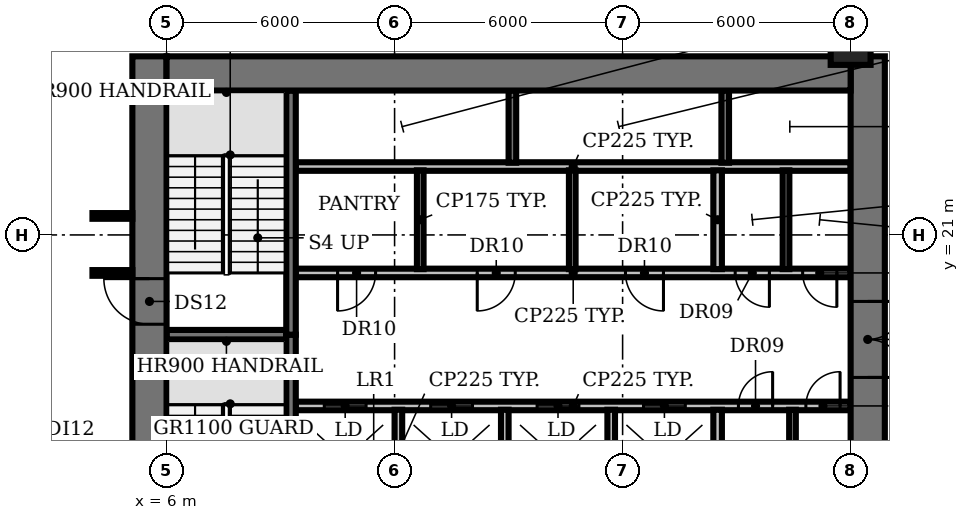
"""IFC4 building model, lengths in metres.
Left out: names, types, materials, properties, quantities, classifications, styles, units other than length and angle.
Written with IfcOpenShell. Run it as: python <this file> out.ifc"""

import sys

from ifc_helpers import new_model, si_unit, direction, frame, frame_2d, origin, origin_2d, place, context, subcontext, project, spatial, rectangle, circle, extrude, element, fill, save


model = new_model("IFC4")
c1 = context("Model", 3, precision=1e-05, world=origin(), true_north=direction((0.0, 1.0)))
c2 = subcontext(c1, "Body", "Model", "MODEL_VIEW")
j1 = project(units=[si_unit("LENGTHUNIT", "METRE"), si_unit("PLANEANGLEUNIT", "RADIAN")], contexts=[c1])
p1 = place(None, origin())
s1 = spatial("IfcSite", under=j1, at=p1, CompositionType="ELEMENT")
p2 = place(p1, origin())
s2 = spatial("IfcBuilding", under=s1, at=p2, CompositionType="ELEMENT")
p3 = place(p2, frame((0.0, 0.0, 58.4)))
s3 = spatial("IfcBuildingStorey", under=s2, at=p3, CompositionType="ELEMENT", Elevation=58.4)
p4 = place(p3, frame((24.0, 26.0, 0.0), z_axis=(0.0, 0.0, 1.0), x_axis=(1.0, 0.0, 0.0)))
e1 = element("IfcColumn", 1, at=p4, inside=s3, PredefinedType="COLUMN", context=c2, shape_type="SweptSolid", body=[
    extrude(circle(Radius=0.525, at=origin_2d()), origin(), (0.0, 0.0, 1.0), 3.85),
])
p5 = place(p3, frame((9.4, 16.5, 0.0), z_axis=(0.0, 0.0, 1.0), x_axis=(1.0, 0.0, 0.0)))
e2 = element("IfcWall", 2, at=p5, inside=s3, PredefinedType="PARTITIONING", context=c2, shape_type="SweptSolid", body=[
    extrude(rectangle(XDim=14.6, YDim=0.225, at=frame_2d((7.3, 0.0))), origin(), (0.0, 0.0, 1.0), 3.85),
])
p6 = place(p5, frame((0.75, 0.0, 0.0)))
e3 = element("IfcOpeningElement", 3, at=p6, cuts=e2, PredefinedType="OPENING", context=c2, shape_type="SweptSolid", body=[
    extrude(rectangle(XDim=1.1, YDim=2.1, at=frame_2d((0.55, 1.05))), frame((0.0, 0.123, 0.0), z_axis=(0.0, -1.0, 0.0), x_axis=(1.0, 0.0, 0.0)), (0.0, 0.0, 1.0), 0.245),
])
p7 = place(p5, frame((3.55, 0.0, 0.0)))
e4 = element("IfcOpeningElement", 4, at=p7, cuts=e2, PredefinedType="OPENING", context=c2, shape_type="SweptSolid", body=[
    extrude(rectangle(XDim=1.1, YDim=2.1, at=frame_2d((0.55, 1.05))), frame((0.0, 0.123, 0.0), z_axis=(0.0, -1.0, 0.0), x_axis=(1.0, 0.0, 0.0)), (0.0, 0.0, 1.0), 0.245),
])
p8 = place(p5, frame((6.35, 0.0, 0.0)))
e5 = element("IfcOpeningElement", 5, at=p8, cuts=e2, PredefinedType="OPENING", context=c2, shape_type="SweptSolid", body=[
    extrude(rectangle(XDim=1.1, YDim=2.1, at=frame_2d((0.55, 1.05))), frame((0.0, 0.123, 0.0), z_axis=(0.0, -1.0, 0.0), x_axis=(1.0, 0.0, 0.0)), (0.0, 0.0, 1.0), 0.245),
])
p9 = place(p5, frame((9.15, 0.0, 0.0)))
e6 = element("IfcOpeningElement", 6, at=p9, cuts=e2, PredefinedType="OPENING", context=c2, shape_type="SweptSolid", body=[
    extrude(rectangle(XDim=1.1, YDim=2.1, at=frame_2d((0.55, 1.05))), frame((0.0, 0.123, 0.0), z_axis=(0.0, -1.0, 0.0), x_axis=(1.0, 0.0, 0.0)), (0.0, 0.0, 1.0), 0.245),
])
p10 = place(p5, frame((11.647, 0.0, 0.0)))
e7 = element("IfcOpeningElement", 7, at=p10, cuts=e2, PredefinedType="OPENING", context=c2, shape_type="SweptSolid", body=[
    extrude(rectangle(XDim=0.9, YDim=2.1, at=frame_2d((0.45, 1.05))), frame((0.0, 0.123, 0.0), z_axis=(0.0, -1.0, 0.0), x_axis=(1.0, 0.0, 0.0)), (0.0, 0.0, 1.0), 0.245),
])
p11 = place(p5, frame((13.423, 0.0, 0.0)))
e8 = element("IfcOpeningElement", 8, at=p11, cuts=e2, PredefinedType="OPENING", context=c2, shape_type="SweptSolid", body=[
    extrude(rectangle(XDim=0.9, YDim=2.1, at=frame_2d((0.45, 1.05))), frame((0.0, 0.123, 0.0), z_axis=(0.0, -1.0, 0.0), x_axis=(1.0, 0.0, 0.0)), (0.0, 0.0, 1.0), 0.245),
])
p12 = place(p3, frame((6.0, 18.375, 0.0), z_axis=(0.0, 0.0, 1.0), x_axis=(1.0, 0.0, 0.0)))
e9 = element("IfcWall", 9, at=p12, inside=s3, PredefinedType="SHEAR", context=c2, shape_type="SweptSolid", body=[
    extrude(rectangle(XDim=3.15, YDim=0.25, at=frame_2d((1.575, 0.0))), origin(), (0.0, 0.0, 1.0), 3.85),
])
p13 = place(p3, frame((24.0, 20.0, 0.0), z_axis=(0.0, 0.0, 1.0), x_axis=(-1.0, 0.0, 0.0)))
e10 = element("IfcWall", 10, at=p13, inside=s3, PredefinedType="PARTITIONING", context=c2, shape_type="SweptSolid", body=[
    extrude(rectangle(XDim=14.6, YDim=0.225, at=frame_2d((7.3, 0.0))), origin(), (0.0, 0.0, 1.0), 3.85),
])
p14 = place(p13, frame((12.5, 0.0, 0.0)))
e11 = element("IfcOpeningElement", 11, at=p14, cuts=e10, PredefinedType="OPENING", context=c2, shape_type="SweptSolid", body=[
    extrude(rectangle(XDim=1.0, YDim=2.1, at=frame_2d((0.5, 1.05))), frame((0.0, 0.123, 0.0), z_axis=(0.0, -1.0, 0.0), x_axis=(1.0, 0.0, 0.0)), (0.0, 0.0, 1.0), 0.245),
])
p15 = place(p13, frame((8.825, 0.0, 0.0)))
e12 = element("IfcOpeningElement", 12, at=p15, cuts=e10, PredefinedType="OPENING", context=c2, shape_type="SweptSolid", body=[
    extrude(rectangle(XDim=1.0, YDim=2.1, at=frame_2d((0.5, 1.05))), frame((0.0, 0.123, 0.0), z_axis=(0.0, -1.0, 0.0), x_axis=(1.0, 0.0, 0.0)), (0.0, 0.0, 1.0), 0.245),
])
p16 = place(p13, frame((4.925, 0.0, 0.0)))
e13 = element("IfcOpeningElement", 13, at=p16, cuts=e10, PredefinedType="OPENING", context=c2, shape_type="SweptSolid", body=[
    extrude(rectangle(XDim=1.0, YDim=2.1, at=frame_2d((0.5, 1.05))), frame((0.0, 0.123, 0.0), z_axis=(0.0, -1.0, 0.0), x_axis=(1.0, 0.0, 0.0)), (0.0, 0.0, 1.0), 0.245),
])
p17 = place(p13, frame((2.137, 0.0, 0.0)))
e14 = element("IfcOpeningElement", 14, at=p17, cuts=e10, PredefinedType="OPENING", context=c2, shape_type="SweptSolid", body=[
    extrude(rectangle(XDim=0.9, YDim=2.1, at=frame_2d((0.45, 1.05))), frame((0.0, 0.123, 0.0), z_axis=(0.0, -1.0, 0.0), x_axis=(1.0, 0.0, 0.0)), (0.0, 0.0, 1.0), 0.245),
])
p18 = place(p13, frame((0.363, 0.0, 0.0)))
e15 = element("IfcOpeningElement", 15, at=p18, cuts=e10, PredefinedType="OPENING", context=c2, shape_type="SweptSolid", body=[
    extrude(rectangle(XDim=0.9, YDim=2.1, at=frame_2d((0.45, 1.05))), frame((0.0, 0.123, 0.0), z_axis=(0.0, -1.0, 0.0), x_axis=(1.0, 0.0, 0.0)), (0.0, 0.0, 1.0), 0.245),
])
p19 = place(p3, frame((9.4, 22.8, 0.0), z_axis=(0.0, 0.0, 1.0), x_axis=(1.0, 0.0, 0.0)))
e16 = element("IfcWall", 16, at=p19, inside=s3, PredefinedType="PARTITIONING", context=c2, shape_type="SweptSolid", body=[
    extrude(rectangle(XDim=14.6, YDim=0.225, at=frame_2d((7.3, 0.0))), origin(), (0.0, 0.0, 1.0), 3.85),
])
p20 = place(p3, frame((9.275, 18.375, 0.0), z_axis=(0.0, 0.0, 1.0), x_axis=(0.0, -1.0, 0.0)))
e17 = element("IfcWall", 17, at=p20, inside=s3, PredefinedType="SHEAR", context=c2, shape_type="SweptSolid", body=[
    extrude(rectangle(XDim=6.55, YDim=0.25, at=frame_2d((3.275, 0.0))), origin(), (0.0, 0.0, 1.0), 3.85),
])
p21 = place(p20, frame((5.075, 0.0, 0.0)))
e18 = element("IfcOpeningElement", 18, at=p21, cuts=e17, PredefinedType="OPENING", context=c2, shape_type="SweptSolid", body=[
    extrude(rectangle(XDim=1.0, YDim=2.1, at=frame_2d((0.5, 1.05))), frame((0.0, 0.135, 0.0), z_axis=(0.0, -1.0, 0.0), x_axis=(1.0, 0.0, 0.0)), (0.0, 0.0, 1.0), 0.27),
])
p22 = place(p3, frame((9.275, 18.375, 0.0), z_axis=(0.0, 0.0, 1.0), x_axis=(0.0, 1.0, 0.0)))
e19 = element("IfcWall", 19, at=p22, inside=s3, PredefinedType="SHEAR", context=c2, shape_type="SweptSolid", body=[
    extrude(rectangle(XDim=6.425, YDim=0.25, at=frame_2d((3.212, 0.0))), origin(), (0.0, 0.0, 1.0), 3.85),
])
p23 = place(p3, frame((12.1, 13.8, 0.0), z_axis=(0.0, 0.0, 1.0), x_axis=(0.0, 1.0, 0.0)))
e20 = element("IfcWall", 20, at=p23, inside=s3, PredefinedType="SOLIDWALL", context=c2, shape_type="SweptSolid", body=[
    extrude(rectangle(XDim=2.6, YDim=0.2, at=frame_2d((1.3, 0.0))), origin(), (0.0, 0.0, 1.0), 3.85),
])
p24 = place(p3, frame((12.675, 20.1, 0.0), z_axis=(0.0, 0.0, 1.0), x_axis=(0.0, 1.0, 0.0)))
e21 = element("IfcWall", 21, at=p24, inside=s3, PredefinedType="PARTITIONING", context=c2, shape_type="SweptSolid", body=[
    extrude(rectangle(XDim=2.6, YDim=0.175, at=frame_2d((1.3, 0.0))), origin(), (0.0, 0.0, 1.0), 3.85),
])
p25 = place(p3, frame((14.9, 13.8, 0.0), z_axis=(0.0, 0.0, 1.0), x_axis=(0.0, 1.0, 0.0)))
e22 = element("IfcWall", 22, at=p25, inside=s3, PredefinedType="SOLIDWALL", context=c2, shape_type="SweptSolid", body=[
    extrude(rectangle(XDim=2.6, YDim=0.2, at=frame_2d((1.3, 0.0))), origin(), (0.0, 0.0, 1.0), 3.85),
])
p26 = place(p3, frame((15.1, 22.9, 0.0), z_axis=(0.0, 0.0, 1.0), x_axis=(0.0, 1.0, 0.0)))
e23 = element("IfcWall", 23, at=p26, inside=s3, PredefinedType="SHEAR", context=c2, shape_type="SweptSolid", body=[
    extrude(rectangle(XDim=1.9, YDim=0.2, at=frame_2d((0.95, 0.0))), origin(), (0.0, 0.0, 1.0), 3.85),
])
p27 = place(p3, frame((16.675, 20.1, 0.0), z_axis=(0.0, 0.0, 1.0), x_axis=(0.0, 1.0, 0.0)))
e24 = element("IfcWall", 24, at=p27, inside=s3, PredefinedType="PARTITIONING", context=c2, shape_type="SweptSolid", body=[
    extrude(rectangle(XDim=2.6, YDim=0.175, at=frame_2d((1.3, 0.0))), origin(), (0.0, 0.0, 1.0), 3.85),
])
p28 = place(p3, frame((17.7, 13.8, 0.0), z_axis=(0.0, 0.0, 1.0), x_axis=(0.0, 1.0, 0.0)))
e25 = element("IfcWall", 25, at=p28, inside=s3, PredefinedType="SOLIDWALL", context=c2, shape_type="SweptSolid", body=[
    extrude(rectangle(XDim=2.6, YDim=0.2, at=frame_2d((1.3, 0.0))), origin(), (0.0, 0.0, 1.0), 3.85),
])
for number, where, z_axis, x_axis in (
    (26, (20.5, 13.8, 0.0), (0.0, 0.0, 1.0), (0.0, 1.0, 0.0)),
    (27, (20.5, 20.1, 0.0), (0.0, 0.0, 1.0), (0.0, 1.0, 0.0)),
):
    element("IfcWall", number, at=place(p3, frame(where, z_axis=z_axis, x_axis=x_axis)), inside=s3, PredefinedType="PARTITIONING", context=c2, shape_type="SweptSolid", body=[
        extrude(rectangle(XDim=2.6, YDim=0.225, at=frame_2d((1.3, 0.0))), origin(), (0.0, 0.0, 1.0), 3.85),
    ])
p29 = place(p3, frame((20.7, 22.9, 0.0), z_axis=(0.0, 0.0, 1.0), x_axis=(0.0, 1.0, 0.0)))
e28 = element("IfcWall", 28, at=p29, inside=s3, PredefinedType="SHEAR", context=c2, shape_type="SweptSolid", body=[
    extrude(rectangle(XDim=1.9, YDim=0.2, at=frame_2d((0.95, 0.0))), origin(), (0.0, 0.0, 1.0), 3.85),
])
for number, where, z_axis, x_axis in (
    (29, (22.3, 20.1, 0.0), (0.0, 0.0, 1.0), (0.0, 1.0, 0.0)),
    (30, (22.47, 13.8, 0.0), (0.0, 0.0, 1.0), (0.0, 1.0, 0.0)),
):
    element("IfcWall", number, at=place(p3, frame(where, z_axis=z_axis, x_axis=x_axis)), inside=s3, PredefinedType="PARTITIONING", context=c2, shape_type="SweptSolid", body=[
        extrude(rectangle(XDim=2.6, YDim=0.175, at=frame_2d((1.3, 0.0))), origin(), (0.0, 0.0, 1.0), 3.85),
    ])
p30 = place(p3, frame((5.55, 4.5, 0.0), z_axis=(0.0, 0.0, 1.0), x_axis=(0.0, 1.0, 0.0)))
e31 = element("IfcWall", 31, at=p30, inside=s3, PredefinedType="SHEAR", context=c2, shape_type="SweptSolid", body=[
    extrude(rectangle(XDim=21.2, YDim=0.9, at=frame_2d((10.6, 0.0))), origin(), (0.0, 0.0, 1.0), 3.85),
])
p31 = place(p30, frame((1.15, 0.0, 0.0)))
e32 = element("IfcOpeningElement", 32, at=p31, cuts=e31, PredefinedType="OPENING", context=c2, shape_type="SweptSolid", body=[
    extrude(rectangle(XDim=1.5, YDim=2.1, at=frame_2d((0.75, 1.05))), frame((0.0, 0.46, 0.0), z_axis=(0.0, -1.0, 0.0), x_axis=(1.0, 0.0, 0.0)), (0.0, 0.0, 1.0), 0.92),
])
p32 = place(p30, frame((7.6, 0.0, 0.0)))
e33 = element("IfcOpeningElement", 33, at=p32, cuts=e31, PredefinedType="OPENING", context=c2, shape_type="SweptSolid", body=[
    extrude(rectangle(XDim=1.2, YDim=2.1, at=frame_2d((0.6, 1.05))), frame((0.0, 0.46, 0.0), z_axis=(0.0, -1.0, 0.0), x_axis=(1.0, 0.0, 0.0)), (0.0, 0.0, 1.0), 0.92),
])
p33 = place(p30, frame((14.15, 0.0, 0.0)))
e34 = element("IfcOpeningElement", 34, at=p33, cuts=e31, PredefinedType="OPENING", context=c2, shape_type="SweptSolid", body=[
    extrude(rectangle(XDim=1.2, YDim=2.1, at=frame_2d((0.6, 1.05))), frame((0.0, 0.46, 0.0), z_axis=(0.0, -1.0, 0.0), x_axis=(1.0, 0.0, 0.0)), (0.0, 0.0, 1.0), 0.92),
])
p34 = place(p3, frame((24.45, 25.7, 0.0), z_axis=(0.0, 0.0, 1.0), x_axis=(0.0, -1.0, 0.0)))
e35 = element("IfcWall", 35, at=p34, inside=s3, PredefinedType="SHEAR", context=c2, shape_type="SweptSolid", body=[
    extrude(rectangle(XDim=21.2, YDim=0.9, at=frame_2d((10.6, 0.0))), origin(), (0.0, 0.0, 1.0), 3.85),
])
p35 = place(p34, frame((18.55, 0.0, 0.0)))
e36 = element("IfcOpeningElement", 36, at=p35, cuts=e35, PredefinedType="OPENING", context=c2, shape_type="SweptSolid", body=[
    extrude(rectangle(XDim=1.5, YDim=2.1, at=frame_2d((0.75, 1.05))), frame((0.0, 0.46, 0.0), z_axis=(0.0, -1.0, 0.0), x_axis=(1.0, 0.0, 0.0)), (0.0, 0.0, 1.0), 0.92),
])
p36 = place(p34, frame((12.45, 0.0, 0.0)))
e37 = element("IfcOpeningElement", 37, at=p36, cuts=e35, PredefinedType="OPENING", context=c2, shape_type="SweptSolid", body=[
    extrude(rectangle(XDim=0.9, YDim=2.1, at=frame_2d((0.45, 1.05))), frame((0.0, 0.46, 0.0), z_axis=(0.0, -1.0, 0.0), x_axis=(1.0, 0.0, 0.0)), (0.0, 0.0, 1.0), 0.92),
])
p37 = place(p34, frame((6.45, 0.0, 0.0)))
e38 = element("IfcOpeningElement", 38, at=p37, cuts=e35, PredefinedType="OPENING", context=c2, shape_type="SweptSolid", body=[
    extrude(rectangle(XDim=2.0, YDim=2.1, at=frame_2d((1.0, 1.05))), frame((0.0, 0.46, 0.0), z_axis=(0.0, -1.0, 0.0), x_axis=(1.0, 0.0, 0.0)), (0.0, 0.0, 1.0), 0.92),
])
p38 = place(p3, frame((6.0, 25.25, 0.0), z_axis=(0.0, 0.0, 1.0), x_axis=(1.0, 0.0, 0.0)))
e39 = element("IfcWall", 39, at=p38, inside=s3, PredefinedType="SHEAR", context=c2, shape_type="SweptSolid", body=[
    extrude(rectangle(XDim=18.0, YDim=0.9, at=frame_2d((9.0, 0.0))), origin(), (0.0, 0.0, 1.0), 3.85),
])
for number, where, z_axis, x_axis in (
    (40, (4.05, 20.0, 0.0), (0.0, 0.0, 1.0), (1.0, 0.0, 0.0)),
    (41, (4.05, 21.5, 0.0), (0.0, 0.0, 1.0), (1.0, 0.0, 0.0)),
):
    element("IfcWall", number, at=place(p3, frame(where, z_axis=z_axis, x_axis=x_axis)), inside=s3, PredefinedType="PARTITIONING", context=c2, shape_type="SweptSolid", body=[
        extrude(rectangle(XDim=1.05, YDim=0.15, at=frame_2d((0.525, 0.0))), origin(), (0.0, 0.0, 1.0), 2.83),
    ])
p39 = place(p6, origin())
e42 = element("IfcDoor", 42, at=p39, inside=s3, OperationType="DOUBLE_DOOR_SLIDING", PredefinedType="DOOR", context=c2, shape_type="SweptSolid", body=[
    extrude(rectangle(XDim=1.1, YDim=2.1, at=frame_2d((0.55, 1.05))), frame((0.0, 0.025, 0.0), z_axis=(0.0, -1.0, 0.0), x_axis=(1.0, 0.0, 0.0)), (0.0, 0.0, 1.0), 0.05),
])
fill(e3, e42)
p40 = place(p7, origin())
e43 = element("IfcDoor", 43, at=p40, inside=s3, OperationType="DOUBLE_DOOR_SLIDING", PredefinedType="DOOR", context=c2, shape_type="SweptSolid", body=[
    extrude(rectangle(XDim=1.1, YDim=2.1, at=frame_2d((0.55, 1.05))), frame((0.0, 0.025, 0.0), z_axis=(0.0, -1.0, 0.0), x_axis=(1.0, 0.0, 0.0)), (0.0, 0.0, 1.0), 0.05),
])
fill(e4, e43)
p41 = place(p8, origin())
e44 = element("IfcDoor", 44, at=p41, inside=s3, OperationType="DOUBLE_DOOR_SLIDING", PredefinedType="DOOR", context=c2, shape_type="SweptSolid", body=[
    extrude(rectangle(XDim=1.1, YDim=2.1, at=frame_2d((0.55, 1.05))), frame((0.0, 0.025, 0.0), z_axis=(0.0, -1.0, 0.0), x_axis=(1.0, 0.0, 0.0)), (0.0, 0.0, 1.0), 0.05),
])
fill(e5, e44)
p42 = place(p9, origin())
e45 = element("IfcDoor", 45, at=p42, inside=s3, OperationType="DOUBLE_DOOR_SLIDING", PredefinedType="DOOR", context=c2, shape_type="SweptSolid", body=[
    extrude(rectangle(XDim=1.1, YDim=2.1, at=frame_2d((0.55, 1.05))), frame((0.0, 0.025, 0.0), z_axis=(0.0, -1.0, 0.0), x_axis=(1.0, 0.0, 0.0)), (0.0, 0.0, 1.0), 0.05),
])
fill(e6, e45)
p43 = place(p10, origin())
e46 = element("IfcDoor", 46, at=p43, inside=s3, OperationType="SINGLE_SWING_RIGHT", PredefinedType="DOOR", context=c2, shape_type="SweptSolid", body=[
    extrude(rectangle(XDim=0.9, YDim=2.1, at=frame_2d((0.45, 1.05))), frame((0.0, 0.025, 0.0), z_axis=(0.0, -1.0, 0.0), x_axis=(1.0, 0.0, 0.0)), (0.0, 0.0, 1.0), 0.05),
])
fill(e7, e46)
p44 = place(p11, origin())
e47 = element("IfcDoor", 47, at=p44, inside=s3, OperationType="SINGLE_SWING_RIGHT", PredefinedType="DOOR", context=c2, shape_type="SweptSolid", body=[
    extrude(rectangle(XDim=0.9, YDim=2.1, at=frame_2d((0.45, 1.05))), frame((0.0, 0.025, 0.0), z_axis=(0.0, -1.0, 0.0), x_axis=(1.0, 0.0, 0.0)), (0.0, 0.0, 1.0), 0.05),
])
fill(e8, e47)
p45 = place(p14, origin())
e48 = element("IfcDoor", 48, at=p45, inside=s3, OperationType="SINGLE_SWING_RIGHT", PredefinedType="DOOR", context=c2, shape_type="SweptSolid", body=[
    extrude(rectangle(XDim=1.0, YDim=2.1, at=frame_2d((0.5, 1.05))), frame((0.0, 0.025, 0.0), z_axis=(0.0, -1.0, 0.0), x_axis=(1.0, 0.0, 0.0)), (0.0, 0.0, 1.0), 0.05),
])
fill(e11, e48)
p46 = place(p15, origin())
e49 = element("IfcDoor", 49, at=p46, inside=s3, OperationType="SINGLE_SWING_RIGHT", PredefinedType="DOOR", context=c2, shape_type="SweptSolid", body=[
    extrude(rectangle(XDim=1.0, YDim=2.1, at=frame_2d((0.5, 1.05))), frame((0.0, 0.025, 0.0), z_axis=(0.0, -1.0, 0.0), x_axis=(1.0, 0.0, 0.0)), (0.0, 0.0, 1.0), 0.05),
])
fill(e12, e49)
p47 = place(p16, origin())
e50 = element("IfcDoor", 50, at=p47, inside=s3, OperationType="SINGLE_SWING_LEFT", PredefinedType="DOOR", context=c2, shape_type="SweptSolid", body=[
    extrude(rectangle(XDim=1.0, YDim=2.1, at=frame_2d((0.5, 1.05))), frame((0.0, 0.025, 0.0), z_axis=(0.0, -1.0, 0.0), x_axis=(1.0, 0.0, 0.0)), (0.0, 0.0, 1.0), 0.05),
])
fill(e13, e50)
p48 = place(p17, origin())
e51 = element("IfcDoor", 51, at=p48, inside=s3, OperationType="SINGLE_SWING_LEFT", PredefinedType="DOOR", context=c2, shape_type="SweptSolid", body=[
    extrude(rectangle(XDim=0.9, YDim=2.1, at=frame_2d((0.45, 1.05))), frame((0.0, 0.025, 0.0), z_axis=(0.0, -1.0, 0.0), x_axis=(1.0, 0.0, 0.0)), (0.0, 0.0, 1.0), 0.05),
])
fill(e14, e51)
p49 = place(p18, origin())
e52 = element("IfcDoor", 52, at=p49, inside=s3, OperationType="SINGLE_SWING_LEFT", PredefinedType="DOOR", context=c2, shape_type="SweptSolid", body=[
    extrude(rectangle(XDim=0.9, YDim=2.1, at=frame_2d((0.45, 1.05))), frame((0.0, 0.025, 0.0), z_axis=(0.0, -1.0, 0.0), x_axis=(1.0, 0.0, 0.0)), (0.0, 0.0, 1.0), 0.05),
])
fill(e15, e52)
p50 = place(p33, origin())
e53 = element("IfcDoor", 53, at=p50, inside=s3, OperationType="SINGLE_SWING_RIGHT", PredefinedType="DOOR", context=c2, shape_type="SweptSolid", body=[
    extrude(rectangle(XDim=1.2, YDim=2.1, at=frame_2d((0.6, 1.05))), frame((0.0, 0.025, 0.0), z_axis=(0.0, -1.0, 0.0), x_axis=(1.0, 0.0, 0.0)), (0.0, 0.0, 1.0), 0.05),
])
fill(e34, e53)
p51 = place(p37, origin())
e54 = element("IfcDoor", 54, at=p51, inside=s3, OperationType="DOUBLE_DOOR_SINGLE_SWING", PredefinedType="DOOR", context=c2, shape_type="SweptSolid", body=[
    extrude(rectangle(XDim=2.0, YDim=2.1, at=frame_2d((1.0, 1.05))), frame((0.0, 0.025, 0.0), z_axis=(0.0, -1.0, 0.0), x_axis=(1.0, 0.0, 0.0)), (0.0, 0.0, 1.0), 0.05),
])
fill(e38, e54)
save(model, sys.argv[1])
